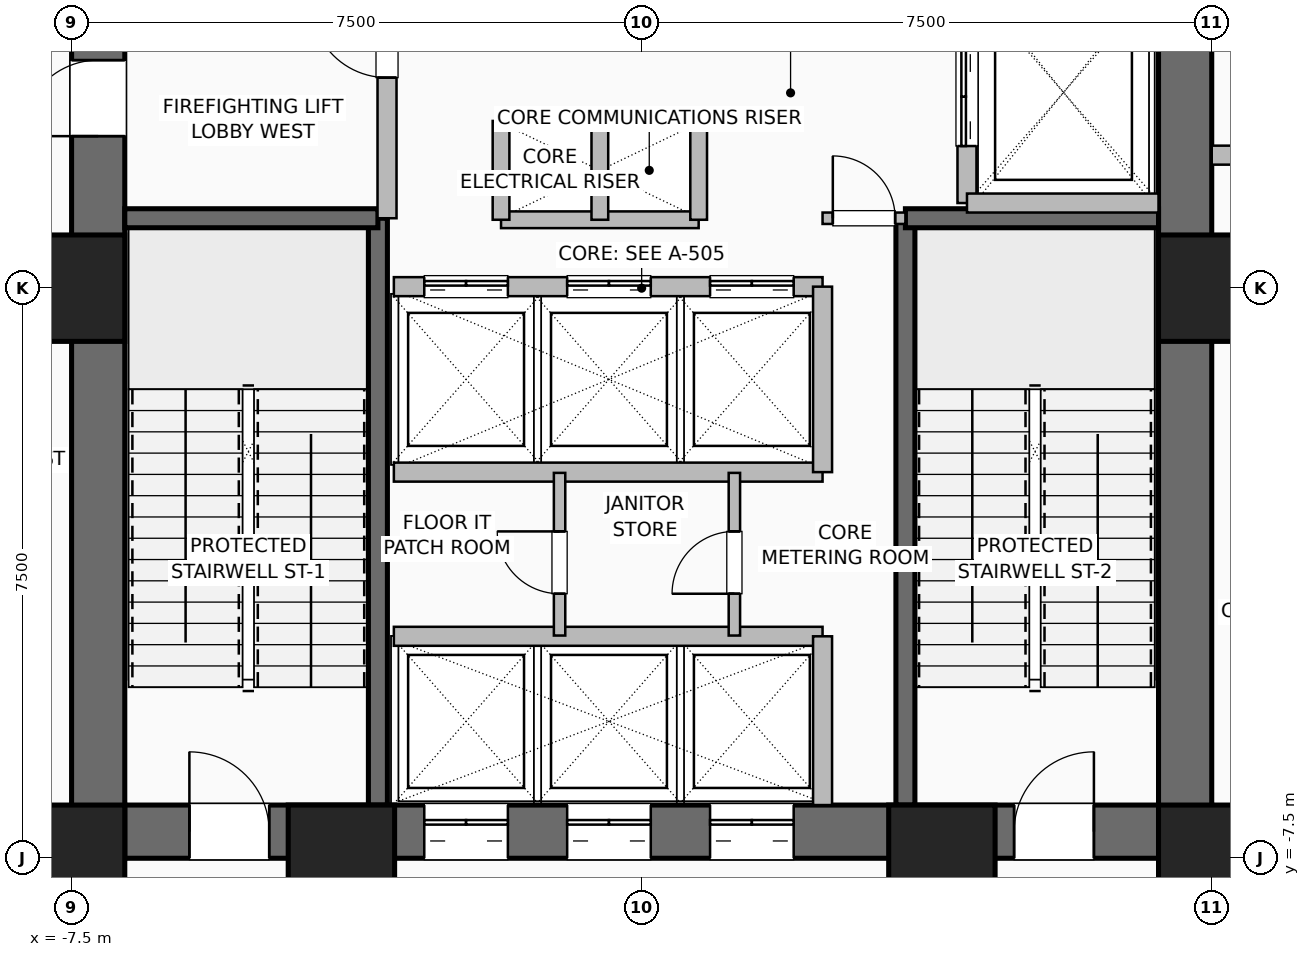
"""IFC4 building model, lengths in metres.
Left out: names, types, materials, properties, quantities, classifications, styles, units other than length and angle.
Written with IfcOpenShell. Run it as: python <this file> out.ifc"""

import sys

from ifc_helpers import new_model, si_unit, direction, frame, frame_2d, origin, origin_2d, place, context, subcontext, project, spatial, rectangle, hollow_rectangle, extrude, element, fill, save


model = new_model("IFC4")
c1 = context("Model", 3, precision=1e-05, world=origin(), true_north=direction((0.0, 1.0)))
c2 = subcontext(c1, "Body", "Model", "MODEL_VIEW")
j1 = project(units=[si_unit("LENGTHUNIT", "METRE"), si_unit("PLANEANGLEUNIT", "RADIAN")], contexts=[c1])
p1 = place(None, origin())
s1 = spatial("IfcSite", under=j1, at=p1, CompositionType="ELEMENT")
p2 = place(p1, origin())
s2 = spatial("IfcBuilding", under=s1, at=p2, CompositionType="ELEMENT")
p3 = place(p2, frame((0.0, 0.0, 10.8)))
s3 = spatial("IfcBuildingStorey", under=s2, at=p3, CompositionType="ELEMENT", Elevation=10.8)
for number, where, z_axis, x_axis in (
    (1, (-7.5, -7.5, 0.0), (0.0, 0.0, 1.0), (1.0, 0.0, 0.0)),
    (2, (-3.95, -7.5, 0.0), (0.0, 0.0, 1.0), (1.0, 0.0, 0.0)),
    (3, (3.95, -7.5, 0.0), (0.0, 0.0, 1.0), (1.0, 0.0, 0.0)),
    (4, (7.5, -7.5, 0.0), (0.0, 0.0, 1.0), (1.0, 0.0, 0.0)),
    (5, (7.5, 0.0, 0.0), (0.0, 0.0, 1.0), (1.0, 0.0, 0.0)),
    (6, (-7.5, 0.0, 0.0), (0.0, 0.0, 1.0), (1.0, 0.0, 0.0)),
):
    element("IfcColumn", number, at=place(p3, frame(where, z_axis=z_axis, x_axis=x_axis)), inside=s3, PredefinedType="COLUMN", context=c2, shape_type="SweptSolid", body=[
        extrude(hollow_rectangle(XDim=1.4, YDim=1.4, WallThickness=0.06, at=origin_2d()), origin(), (0.0, 0.0, 1.0), 5.4),
    ])
p4 = place(p3, frame((-7.5, -7.15, 0.0), z_axis=(0.0, 0.0, 1.0), x_axis=(1.0, 0.0, 0.0)))
e7 = element("IfcWall", 7, at=p4, inside=s3, PredefinedType="SHEAR", context=c2, shape_type="SweptSolid", body=[
    extrude(rectangle(XDim=15.0, YDim=0.7, at=frame_2d((7.5, 0.0))), origin(), (0.0, 0.0, 1.0), 5.0),
])
p5 = place(p4, frame((1.55, 0.0, 0.0)))
e8 = element("IfcOpeningElement", 8, at=p5, cuts=e7, PredefinedType="OPENING", context=c2, shape_type="SweptSolid", body=[
    extrude(rectangle(XDim=1.05, YDim=2.08, at=frame_2d((0.525, 1.04))), frame((0.0, 0.36, 0.0), z_axis=(0.0, -1.0, 0.0), x_axis=(1.0, 0.0, 0.0)), (0.0, 0.0, 1.0), 0.72),
])
p6 = place(p4, frame((12.4, 0.0, 0.0)))
e9 = element("IfcOpeningElement", 9, at=p6, cuts=e7, PredefinedType="OPENING", context=c2, shape_type="SweptSolid", body=[
    extrude(rectangle(XDim=1.05, YDim=2.08, at=frame_2d((0.525, 1.04))), frame((0.0, 0.36, 0.0), z_axis=(0.0, -1.0, 0.0), x_axis=(1.0, 0.0, 0.0)), (0.0, 0.0, 1.0), 0.72),
])
p7 = place(p4, frame((4.64, 0.0, 0.0)))
e10 = element("IfcOpeningElement", 10, at=p7, cuts=e7, PredefinedType="OPENING", context=c2, shape_type="SweptSolid", body=[
    extrude(rectangle(XDim=1.1, YDim=2.2, at=frame_2d((0.55, 1.1))), frame((0.0, 0.36, 0.0), z_axis=(0.0, -1.0, 0.0), x_axis=(1.0, 0.0, 0.0)), (0.0, 0.0, 1.0), 0.72),
])
p8 = place(p4, frame((6.52, 0.0, 0.0)))
e11 = element("IfcOpeningElement", 11, at=p8, cuts=e7, PredefinedType="OPENING", context=c2, shape_type="SweptSolid", body=[
    extrude(rectangle(XDim=1.1, YDim=2.2, at=frame_2d((0.55, 1.1))), frame((0.0, 0.36, 0.0), z_axis=(0.0, -1.0, 0.0), x_axis=(1.0, 0.0, 0.0)), (0.0, 0.0, 1.0), 0.72),
])
p9 = place(p4, frame((8.4, 0.0, 0.0)))
e12 = element("IfcOpeningElement", 12, at=p9, cuts=e7, PredefinedType="OPENING", context=c2, shape_type="SweptSolid", body=[
    extrude(rectangle(XDim=1.1, YDim=2.2, at=frame_2d((0.55, 1.1))), frame((0.0, 0.36, 0.0), z_axis=(0.0, -1.0, 0.0), x_axis=(1.0, 0.0, 0.0)), (0.0, 0.0, 1.0), 0.72),
])
p10 = place(p3, frame((-7.15, -7.5, 0.0), z_axis=(0.0, 0.0, 1.0), x_axis=(0.0, 1.0, 0.0)))
e13 = element("IfcWall", 13, at=p10, inside=s3, PredefinedType="SHEAR", context=c2, shape_type="SweptSolid", body=[
    extrude(rectangle(XDim=15.0, YDim=0.7, at=frame_2d((7.5, 0.0))), origin(), (0.0, 0.0, 1.0), 5.0),
])
p11 = place(p10, frame((9.5, 0.0, 0.0)))
e14 = element("IfcOpeningElement", 14, at=p11, cuts=e13, PredefinedType="OPENING", context=c2, shape_type="SweptSolid", body=[
    extrude(rectangle(XDim=1.0, YDim=2.08, at=frame_2d((0.5, 1.04))), frame((0.0, 0.36, 0.0), z_axis=(0.0, -1.0, 0.0), x_axis=(1.0, 0.0, 0.0)), (0.0, 0.0, 1.0), 0.72),
])
p12 = place(p3, frame((7.15, -7.5, 0.0), z_axis=(0.0, 0.0, 1.0), x_axis=(0.0, 1.0, 0.0)))
e15 = element("IfcWall", 15, at=p12, inside=s3, PredefinedType="SHEAR", context=c2, shape_type="SweptSolid", body=[
    extrude(rectangle(XDim=15.0, YDim=0.7, at=frame_2d((7.5, 0.0))), origin(), (0.0, 0.0, 1.0), 5.0),
])
p13 = place(p12, frame((12.6, 0.0, 0.0)))
e16 = element("IfcOpeningElement", 16, at=p13, cuts=e15, PredefinedType="OPENING", context=c2, shape_type="SweptSolid", body=[
    extrude(rectangle(XDim=1.2, YDim=2.2, at=frame_2d((0.6, 1.1))), frame((0.0, 0.36, 0.0), z_axis=(0.0, -1.0, 0.0), x_axis=(1.0, 0.0, 0.0)), (0.0, 0.0, 1.0), 0.72),
])
p14 = place(p3, frame((-3.47, -6.8, 0.0), z_axis=(0.0, 0.0, 1.0), x_axis=(0.0, 1.0, 0.0)))
e17 = element("IfcWall", 17, at=p14, inside=s3, PredefinedType="SHEAR", context=c2, shape_type="SweptSolid", body=[
    extrude(rectangle(XDim=7.72, YDim=0.25, at=frame_2d((3.86, 0.0))), origin(), (0.0, 0.0, 1.0), 5.0),
])
p15 = place(p3, frame((-6.8, 0.92, 0.0), z_axis=(0.0, 0.0, 1.0), x_axis=(1.0, 0.0, 0.0)))
e18 = element("IfcWall", 18, at=p15, inside=s3, PredefinedType="SHEAR", context=c2, shape_type="SweptSolid", body=[
    extrude(rectangle(XDim=3.33, YDim=0.25, at=frame_2d((1.665, 0.0))), origin(), (0.0, 0.0, 1.0), 5.0),
])
p16 = place(p3, frame((3.47, -6.8, 0.0), z_axis=(0.0, 0.0, 1.0), x_axis=(0.0, 1.0, 0.0)))
e19 = element("IfcWall", 19, at=p16, inside=s3, PredefinedType="SHEAR", context=c2, shape_type="SweptSolid", body=[
    extrude(rectangle(XDim=7.72, YDim=0.25, at=frame_2d((3.86, 0.0))), origin(), (0.0, 0.0, 1.0), 5.0),
])
p17 = place(p3, frame((3.47, 0.92, 0.0), z_axis=(0.0, 0.0, 1.0), x_axis=(1.0, 0.0, 0.0)))
e20 = element("IfcWall", 20, at=p17, inside=s3, PredefinedType="SHEAR", context=c2, shape_type="SweptSolid", body=[
    extrude(rectangle(XDim=3.33, YDim=0.25, at=frame_2d((1.665, 0.0))), origin(), (0.0, 0.0, 1.0), 5.0),
])
for number, where, z_axis, x_axis in (
    (21, (-1.85, 2.2, 0.0), (0.0, 0.0, 1.0), (1.0, 0.0, 0.0)),
    (22, (-1.85, 0.9, 0.0), (0.0, 0.0, 1.0), (1.0, 0.0, 0.0)),
):
    element("IfcWall", number, at=place(p3, frame(where, z_axis=z_axis, x_axis=x_axis)), inside=s3, PredefinedType="PARTITIONING", context=c2, shape_type="SweptSolid", body=[
        extrude(rectangle(XDim=2.6, YDim=0.22, at=frame_2d((1.3, 0.0))), origin(), (0.0, 0.0, 1.0), 5.0),
    ])
for number, where, z_axis, x_axis in (
    (23, (-0.55, 0.9, 0.0), (0.0, 0.0, 1.0), (0.0, 1.0, 0.0)),
    (24, (0.75, 0.9, 0.0), (0.0, 0.0, 1.0), (0.0, 1.0, 0.0)),
    (25, (-1.85, 0.9, 0.0), (0.0, 0.0, 1.0), (0.0, 1.0, 0.0)),
):
    element("IfcWall", number, at=place(p3, frame(where, z_axis=z_axis, x_axis=x_axis)), inside=s3, PredefinedType="PARTITIONING", context=c2, shape_type="SweptSolid", body=[
        extrude(rectangle(XDim=1.3, YDim=0.22, at=frame_2d((0.65, 0.0))), origin(), (0.0, 0.0, 1.0), 5.0),
    ])
p18 = place(p3, frame((-3.26, -4.58, 0.0), z_axis=(0.0, 0.0, 1.0), x_axis=(1.0, 0.0, 0.0)))
e26 = element("IfcWall", 26, at=p18, inside=s3, PredefinedType="SHEAR", context=c2, shape_type="SweptSolid", body=[
    extrude(rectangle(XDim=5.64, YDim=0.25, at=frame_2d((2.82, 0.0))), origin(), (0.0, 0.0, 1.0), 5.0),
])
p19 = place(p3, frame((2.38, -6.8, 0.0), z_axis=(0.0, 0.0, 1.0), x_axis=(0.0, 1.0, 0.0)))
e27 = element("IfcWall", 27, at=p19, inside=s3, PredefinedType="SHEAR", context=c2, shape_type="SweptSolid", body=[
    extrude(rectangle(XDim=2.22, YDim=0.25, at=frame_2d((1.11, 0.0))), origin(), (0.0, 0.0, 1.0), 5.0),
])
p20 = place(p3, frame((-3.26, 0.02, 0.0), z_axis=(0.0, 0.0, 1.0), x_axis=(1.0, 0.0, 0.0)))
e28 = element("IfcWall", 28, at=p20, inside=s3, PredefinedType="SHEAR", context=c2, shape_type="SweptSolid", body=[
    extrude(rectangle(XDim=5.64, YDim=0.25, at=frame_2d((2.82, 0.0))), origin(), (0.0, 0.0, 1.0), 5.0),
])
p21 = place(p20, frame((0.4, 0.0, 0.0)))
e29 = element("IfcOpeningElement", 29, at=p21, cuts=e28, PredefinedType="OPENING", context=c2, shape_type="SweptSolid", body=[
    extrude(rectangle(XDim=1.1, YDim=2.2, at=frame_2d((0.55, 1.1))), frame((0.0, 0.135, 0.0), z_axis=(0.0, -1.0, 0.0), x_axis=(1.0, 0.0, 0.0)), (0.0, 0.0, 1.0), 0.27),
])
p22 = place(p20, frame((2.28, 0.0, 0.0)))
e30 = element("IfcOpeningElement", 30, at=p22, cuts=e28, PredefinedType="OPENING", context=c2, shape_type="SweptSolid", body=[
    extrude(rectangle(XDim=1.1, YDim=2.2, at=frame_2d((0.55, 1.1))), frame((0.0, 0.135, 0.0), z_axis=(0.0, -1.0, 0.0), x_axis=(1.0, 0.0, 0.0)), (0.0, 0.0, 1.0), 0.27),
])
p23 = place(p20, frame((4.16, 0.0, 0.0)))
e31 = element("IfcOpeningElement", 31, at=p23, cuts=e28, PredefinedType="OPENING", context=c2, shape_type="SweptSolid", body=[
    extrude(rectangle(XDim=1.1, YDim=2.2, at=frame_2d((0.55, 1.1))), frame((0.0, 0.135, 0.0), z_axis=(0.0, -1.0, 0.0), x_axis=(1.0, 0.0, 0.0)), (0.0, 0.0, 1.0), 0.27),
])
p24 = place(p3, frame((-3.26, -2.42, 0.0), z_axis=(0.0, 0.0, 1.0), x_axis=(1.0, 0.0, 0.0)))
e32 = element("IfcWall", 32, at=p24, inside=s3, PredefinedType="SHEAR", context=c2, shape_type="SweptSolid", body=[
    extrude(rectangle(XDim=5.64, YDim=0.25, at=frame_2d((2.82, 0.0))), origin(), (0.0, 0.0, 1.0), 5.0),
])
p25 = place(p3, frame((2.38, -2.42, 0.0), z_axis=(0.0, 0.0, 1.0), x_axis=(0.0, 1.0, 0.0)))
e33 = element("IfcWall", 33, at=p25, inside=s3, PredefinedType="SHEAR", context=c2, shape_type="SweptSolid", body=[
    extrude(rectangle(XDim=2.44, YDim=0.25, at=frame_2d((1.22, 0.0))), origin(), (0.0, 0.0, 1.0), 5.0),
])
p26 = place(p3, frame((4.28, 1.12, 0.0), z_axis=(0.0, 0.0, 1.0), x_axis=(0.0, 1.0, 0.0)))
e34 = element("IfcWall", 34, at=p26, inside=s3, PredefinedType="SHEAR", context=c2, shape_type="SweptSolid", body=[
    extrude(rectangle(XDim=2.9, YDim=0.25, at=frame_2d((1.45, 0.0))), origin(), (0.0, 0.0, 1.0), 5.0),
])
p27 = place(p26, frame((0.75, 0.0, 0.0)))
e35 = element("IfcOpeningElement", 35, at=p27, cuts=e34, PredefinedType="OPENING", context=c2, shape_type="SweptSolid", body=[
    extrude(rectangle(XDim=1.3, YDim=2.3, at=frame_2d((0.65, 1.15))), frame((0.0, 0.135, 0.0), z_axis=(0.0, -1.0, 0.0), x_axis=(1.0, 0.0, 0.0)), (0.0, 0.0, 1.0), 0.27),
])
p28 = place(p3, frame((4.28, 1.12, 0.0), z_axis=(0.0, 0.0, 1.0), x_axis=(1.0, 0.0, 0.0)))
e36 = element("IfcWall", 36, at=p28, inside=s3, PredefinedType="SHEAR", context=c2, shape_type="SweptSolid", body=[
    extrude(rectangle(XDim=2.52, YDim=0.25, at=frame_2d((1.26, 0.0))), origin(), (0.0, 0.0, 1.0), 5.0),
])
p29 = place(p3, frame((-3.35, 0.92, 0.0), z_axis=(0.0, 0.0, 1.0), x_axis=(0.0, 1.0, 0.0)))
e37 = element("IfcWall", 37, at=p29, inside=s3, PredefinedType="SHEAR", context=c2, shape_type="SweptSolid", body=[
    extrude(rectangle(XDim=3.62, YDim=0.25, at=frame_2d((1.81, 0.0))), origin(), (0.0, 0.0, 1.0), 5.0),
])
p30 = place(p29, frame((1.85, 0.0, 0.0)))
e38 = element("IfcOpeningElement", 38, at=p30, cuts=e37, PredefinedType="OPENING", context=c2, shape_type="SweptSolid", body=[
    extrude(rectangle(XDim=1.0, YDim=2.08, at=frame_2d((0.5, 1.04))), frame((0.0, 0.135, 0.0), z_axis=(0.0, -1.0, 0.0), x_axis=(1.0, 0.0, 0.0)), (0.0, 0.0, 1.0), 0.27),
])
p31 = place(p3, frame((2.38, 0.92, 0.0), z_axis=(0.0, 0.0, 1.0), x_axis=(1.0, 0.0, 0.0)))
e39 = element("IfcWall", 39, at=p31, inside=s3, PredefinedType="PARTITIONING", context=c2, shape_type="SweptSolid", body=[
    extrude(rectangle(XDim=1.09, YDim=0.15, at=frame_2d((0.545, 0.0))), origin(), (0.0, 0.0, 1.0), 5.0),
])
p32 = place(p31, frame((0.135, 0.0, 0.0)))
e40 = element("IfcOpeningElement", 40, at=p32, cuts=e39, PredefinedType="OPENING", context=c2, shape_type="SweptSolid", body=[
    extrude(rectangle(XDim=0.82, YDim=2.05, at=frame_2d((0.41, 1.025))), frame((0.0, 0.085, 0.0), z_axis=(0.0, -1.0, 0.0), x_axis=(1.0, 0.0, 0.0)), (0.0, 0.0, 1.0), 0.17),
])
p33 = place(p3, frame((-1.08, -4.57, 0.0), z_axis=(0.0, 0.0, 1.0), x_axis=(0.0, 1.0, 0.0)))
e41 = element("IfcWall", 41, at=p33, inside=s3, PredefinedType="PARTITIONING", context=c2, shape_type="SweptSolid", body=[
    extrude(rectangle(XDim=2.14, YDim=0.15, at=frame_2d((1.07, 0.0))), origin(), (0.0, 0.0, 1.0), 5.0),
])
p34 = place(p33, frame((0.55, 0.0, 0.0)))
e42 = element("IfcOpeningElement", 42, at=p34, cuts=e41, PredefinedType="OPENING", context=c2, shape_type="SweptSolid", body=[
    extrude(rectangle(XDim=0.82, YDim=2.05, at=frame_2d((0.41, 1.025))), frame((0.0, 0.085, 0.0), z_axis=(0.0, -1.0, 0.0), x_axis=(1.0, 0.0, 0.0)), (0.0, 0.0, 1.0), 0.17),
])
p35 = place(p3, frame((1.22, -4.57, 0.0), z_axis=(0.0, 0.0, 1.0), x_axis=(0.0, 1.0, 0.0)))
e43 = element("IfcWall", 43, at=p35, inside=s3, PredefinedType="PARTITIONING", context=c2, shape_type="SweptSolid", body=[
    extrude(rectangle(XDim=2.14, YDim=0.15, at=frame_2d((1.07, 0.0))), origin(), (0.0, 0.0, 1.0), 5.0),
])
p36 = place(p35, frame((0.55, 0.0, 0.0)))
e44 = element("IfcOpeningElement", 44, at=p36, cuts=e43, PredefinedType="OPENING", context=c2, shape_type="SweptSolid", body=[
    extrude(rectangle(XDim=0.82, YDim=2.05, at=frame_2d((0.41, 1.025))), frame((0.0, 0.085, 0.0), z_axis=(0.0, -1.0, 0.0), x_axis=(1.0, 0.0, 0.0)), (0.0, 0.0, 1.0), 0.17),
])
p37 = place(p3, frame((7.5, 1.75, 0.0), z_axis=(0.0, 0.0, 1.0), x_axis=(1.0, 0.0, 0.0)))
e45 = element("IfcWall", 45, at=p37, inside=s3, PredefinedType="SHEAR", context=c2, shape_type="SweptSolid", body=[
    extrude(rectangle(XDim=5.4, YDim=0.25, at=frame_2d((2.7, 0.0))), origin(), (0.0, 0.0, 1.0), 5.0),
])
p38 = place(p5, origin())
e46 = element("IfcDoor", 46, at=p38, inside=s3, OperationType="SINGLE_SWING_LEFT", PredefinedType="DOOR", context=c2, shape_type="SweptSolid", body=[
    extrude(rectangle(XDim=1.05, YDim=2.08, at=frame_2d((0.525, 1.04))), frame((0.0, 0.025, 0.0), z_axis=(0.0, -1.0, 0.0), x_axis=(1.0, 0.0, 0.0)), (0.0, 0.0, 1.0), 0.05),
])
fill(e8, e46)
p39 = place(p6, origin())
e47 = element("IfcDoor", 47, at=p39, inside=s3, OperationType="SINGLE_SWING_RIGHT", PredefinedType="DOOR", context=c2, shape_type="SweptSolid", body=[
    extrude(rectangle(XDim=1.05, YDim=2.08, at=frame_2d((0.525, 1.04))), frame((0.0, 0.025, 0.0), z_axis=(0.0, -1.0, 0.0), x_axis=(1.0, 0.0, 0.0)), (0.0, 0.0, 1.0), 0.05),
])
fill(e9, e47)
p40 = place(p11, origin())
e48 = element("IfcDoor", 48, at=p40, inside=s3, OperationType="SINGLE_SWING_LEFT", PredefinedType="DOOR", context=c2, shape_type="SweptSolid", body=[
    extrude(rectangle(XDim=1.0, YDim=2.08, at=frame_2d((0.5, 1.04))), frame((0.0, 0.025, 0.0), z_axis=(0.0, -1.0, 0.0), x_axis=(1.0, 0.0, 0.0)), (0.0, 0.0, 1.0), 0.05),
])
fill(e14, e48)
p41 = place(p7, origin())
e49 = element("IfcDoor", 49, at=p41, inside=s3, OperationType="DOUBLE_DOOR_SLIDING", PredefinedType="DOOR", context=c2, shape_type="SweptSolid", body=[
    extrude(rectangle(XDim=1.1, YDim=2.2, at=frame_2d((0.55, 1.1))), frame((0.0, 0.025, 0.0), z_axis=(0.0, -1.0, 0.0), x_axis=(1.0, 0.0, 0.0)), (0.0, 0.0, 1.0), 0.05),
])
fill(e10, e49)
p42 = place(p8, origin())
e50 = element("IfcDoor", 50, at=p42, inside=s3, OperationType="DOUBLE_DOOR_SLIDING", PredefinedType="DOOR", context=c2, shape_type="SweptSolid", body=[
    extrude(rectangle(XDim=1.1, YDim=2.2, at=frame_2d((0.55, 1.1))), frame((0.0, 0.025, 0.0), z_axis=(0.0, -1.0, 0.0), x_axis=(1.0, 0.0, 0.0)), (0.0, 0.0, 1.0), 0.05),
])
fill(e11, e50)
p43 = place(p9, origin())
e51 = element("IfcDoor", 51, at=p43, inside=s3, OperationType="DOUBLE_DOOR_SLIDING", PredefinedType="DOOR", context=c2, shape_type="SweptSolid", body=[
    extrude(rectangle(XDim=1.1, YDim=2.2, at=frame_2d((0.55, 1.1))), frame((0.0, 0.025, 0.0), z_axis=(0.0, -1.0, 0.0), x_axis=(1.0, 0.0, 0.0)), (0.0, 0.0, 1.0), 0.05),
])
fill(e12, e51)
p44 = place(p21, origin())
e52 = element("IfcDoor", 52, at=p44, inside=s3, OperationType="DOUBLE_DOOR_SLIDING", PredefinedType="DOOR", context=c2, shape_type="SweptSolid", body=[
    extrude(rectangle(XDim=1.1, YDim=2.2, at=frame_2d((0.55, 1.1))), frame((0.0, 0.025, 0.0), z_axis=(0.0, -1.0, 0.0), x_axis=(1.0, 0.0, 0.0)), (0.0, 0.0, 1.0), 0.05),
])
fill(e29, e52)
p45 = place(p22, origin())
e53 = element("IfcDoor", 53, at=p45, inside=s3, OperationType="DOUBLE_DOOR_SLIDING", PredefinedType="DOOR", context=c2, shape_type="SweptSolid", body=[
    extrude(rectangle(XDim=1.1, YDim=2.2, at=frame_2d((0.55, 1.1))), frame((0.0, 0.025, 0.0), z_axis=(0.0, -1.0, 0.0), x_axis=(1.0, 0.0, 0.0)), (0.0, 0.0, 1.0), 0.05),
])
fill(e30, e53)
p46 = place(p23, origin())
e54 = element("IfcDoor", 54, at=p46, inside=s3, OperationType="DOUBLE_DOOR_SLIDING", PredefinedType="DOOR", context=c2, shape_type="SweptSolid", body=[
    extrude(rectangle(XDim=1.1, YDim=2.2, at=frame_2d((0.55, 1.1))), frame((0.0, 0.025, 0.0), z_axis=(0.0, -1.0, 0.0), x_axis=(1.0, 0.0, 0.0)), (0.0, 0.0, 1.0), 0.05),
])
fill(e31, e54)
p47 = place(p27, origin())
e55 = element("IfcDoor", 55, at=p47, inside=s3, OperationType="DOUBLE_DOOR_SLIDING", PredefinedType="DOOR", context=c2, shape_type="SweptSolid", body=[
    extrude(rectangle(XDim=1.3, YDim=2.3, at=frame_2d((0.65, 1.15))), frame((0.0, 0.025, 0.0), z_axis=(0.0, -1.0, 0.0), x_axis=(1.0, 0.0, 0.0)), (0.0, 0.0, 1.0), 0.05),
])
fill(e35, e55)
p48 = place(p30, origin())
e56 = element("IfcDoor", 56, at=p48, inside=s3, OperationType="SINGLE_SWING_RIGHT", PredefinedType="DOOR", context=c2, shape_type="SweptSolid", body=[
    extrude(rectangle(XDim=1.0, YDim=2.08, at=frame_2d((0.5, 1.04))), frame((0.0, 0.025, 0.0), z_axis=(0.0, -1.0, 0.0), x_axis=(1.0, 0.0, 0.0)), (0.0, 0.0, 1.0), 0.05),
])
fill(e38, e56)
p49 = place(p32, origin())
e57 = element("IfcDoor", 57, at=p49, inside=s3, OperationType="SINGLE_SWING_LEFT", PredefinedType="DOOR", context=c2, shape_type="SweptSolid", body=[
    extrude(rectangle(XDim=0.82, YDim=2.05, at=frame_2d((0.41, 1.025))), frame((0.0, 0.025, 0.0), z_axis=(0.0, -1.0, 0.0), x_axis=(1.0, 0.0, 0.0)), (0.0, 0.0, 1.0), 0.05),
])
fill(e40, e57)
p50 = place(p34, origin())
e58 = element("IfcDoor", 58, at=p50, inside=s3, OperationType="SINGLE_SWING_RIGHT", PredefinedType="DOOR", context=c2, shape_type="SweptSolid", body=[
    extrude(rectangle(XDim=0.82, YDim=2.05, at=frame_2d((0.41, 1.025))), frame((0.0, 0.025, 0.0), z_axis=(0.0, -1.0, 0.0), x_axis=(1.0, 0.0, 0.0)), (0.0, 0.0, 1.0), 0.05),
])
fill(e42, e58)
p51 = place(p36, origin())
e59 = element("IfcDoor", 59, at=p51, inside=s3, OperationType="SINGLE_SWING_LEFT", PredefinedType="DOOR", context=c2, shape_type="SweptSolid", body=[
    extrude(rectangle(XDim=0.82, YDim=2.05, at=frame_2d((0.41, 1.025))), frame((0.0, 0.025, 0.0), z_axis=(0.0, -1.0, 0.0), x_axis=(1.0, 0.0, 0.0)), (0.0, 0.0, 1.0), 0.05),
])
fill(e44, e59)
save(model, sys.argv[1])
